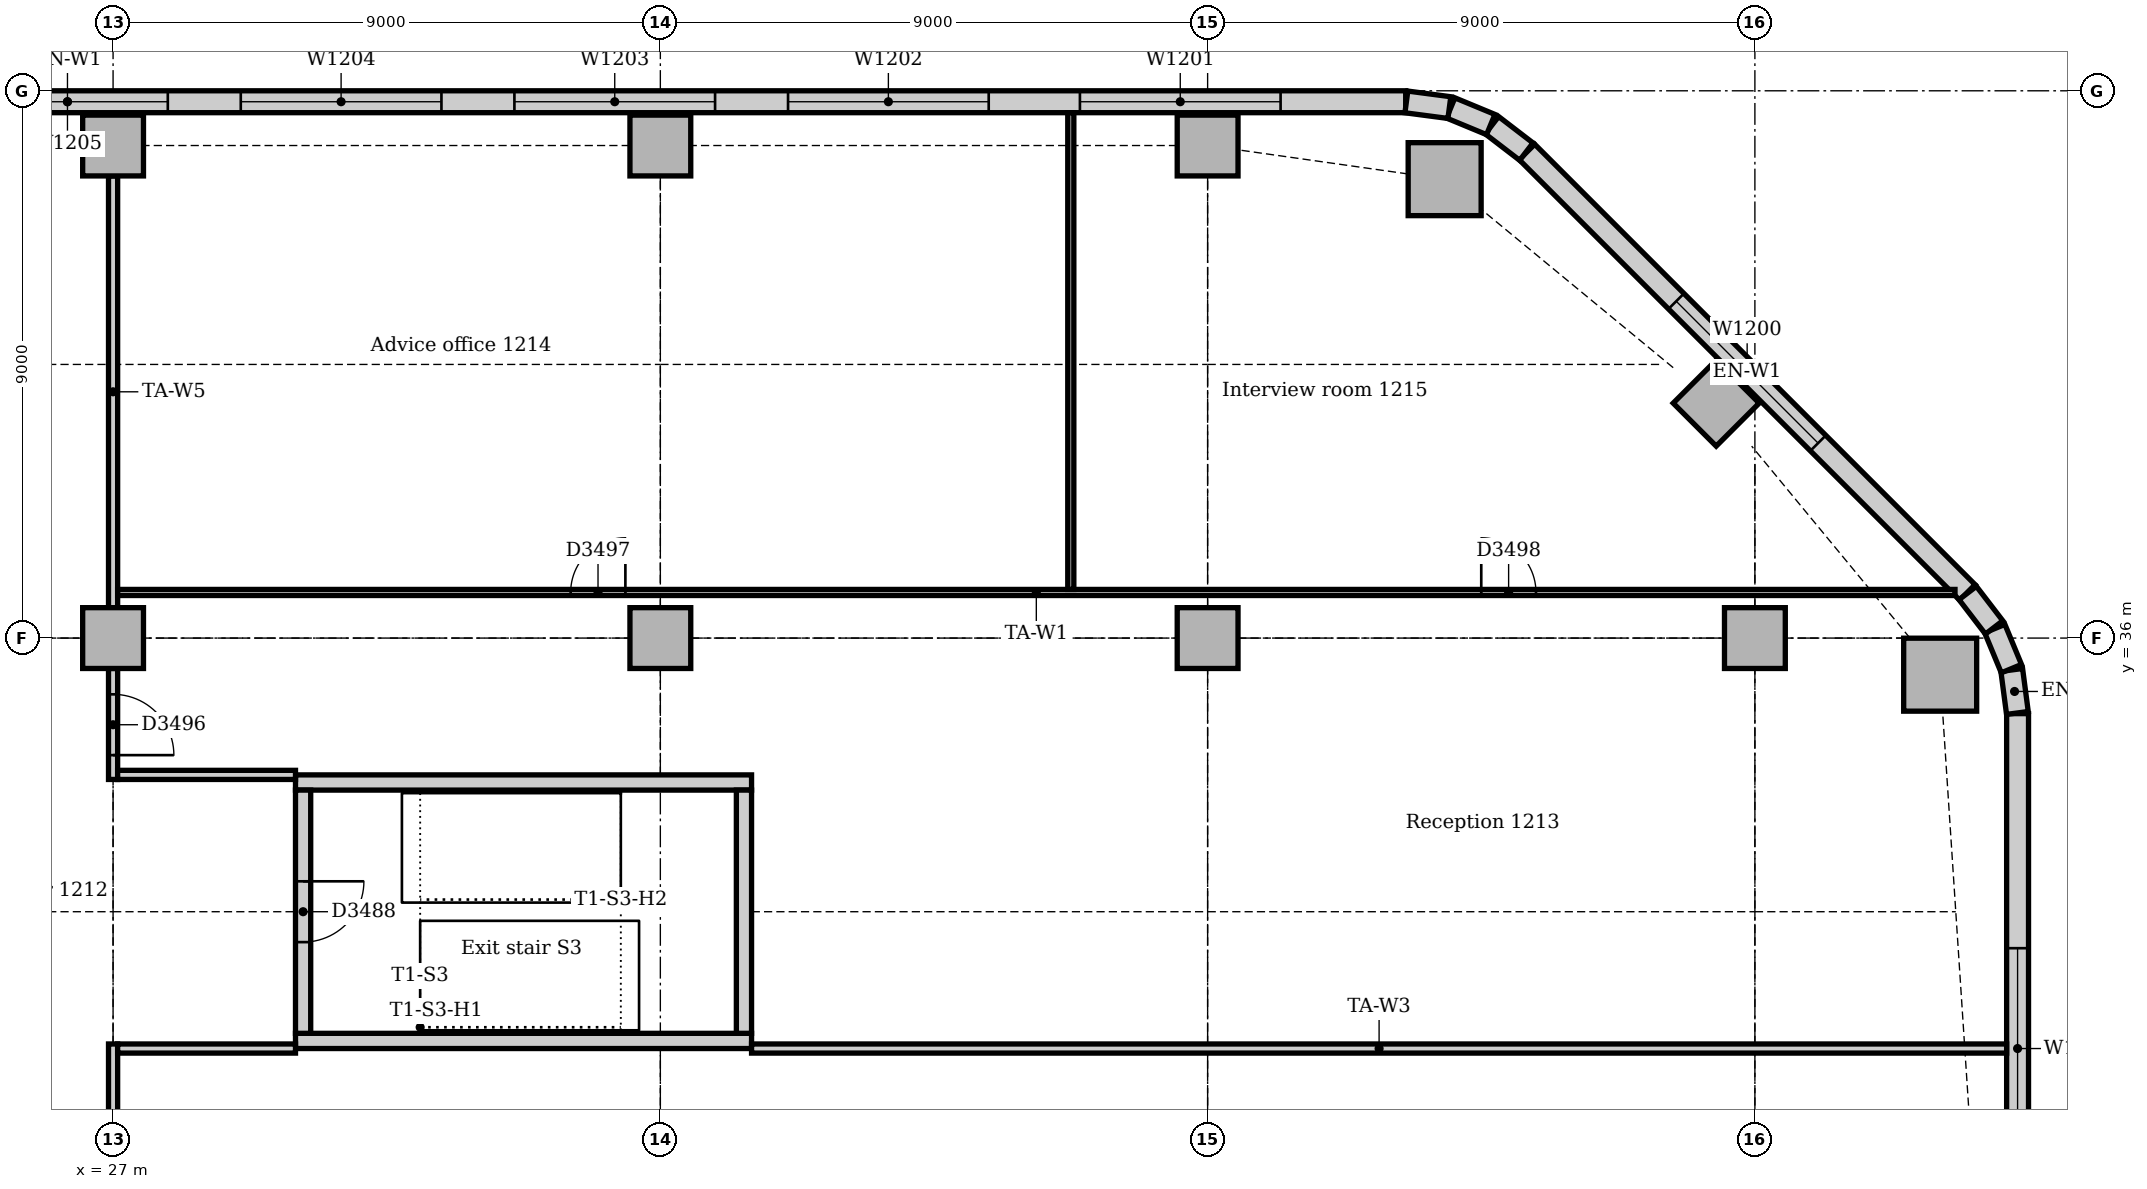
"""IFC4 building model, lengths in metres.
Left out: names, types, materials, properties, quantities, classifications, styles, units other than length and angle.
Written with IfcOpenShell. Run it as: python <this file> out.ifc"""

import sys

from ifc_helpers import new_model, si_unit, direction, frame, frame_2d, origin, origin_2d, place, context, subcontext, project, spatial, rectangle, extrude, element, fill, save


model = new_model("IFC4")
c1 = context("Model", 3, precision=1e-05, world=origin(), true_north=direction((0.0, 1.0)))
c2 = subcontext(c1, "Body", "Model", "MODEL_VIEW")
j1 = project(units=[si_unit("LENGTHUNIT", "METRE"), si_unit("PLANEANGLEUNIT", "RADIAN")], contexts=[c1])
p1 = place(None, origin())
s1 = spatial("IfcSite", under=j1, at=p1, CompositionType="ELEMENT")
p2 = place(p1, origin())
s2 = spatial("IfcBuilding", under=s1, at=p2, CompositionType="ELEMENT")
p3 = place(p2, frame((0.0, 0.0, 55.0)))
s3 = spatial("IfcBuildingStorey", under=s2, at=p3, CompositionType="ELEMENT", Elevation=55.0)
for number, where, z_axis, x_axis in (
    (1, (30.0, 29.375, 0.0), (0.0, 0.0, 1.0), (1.0, 0.0, 0.0)),
    (2, (37.5, 33.625, 0.0), (0.0, 0.0, 1.0), (-1.0, 0.0, 0.0)),
):
    element("IfcWall", number, at=place(p3, frame(where, z_axis=z_axis, x_axis=x_axis)), inside=s3, PredefinedType="SOLIDWALL", context=c2, shape_type="SweptSolid", body=[
        extrude(rectangle(XDim=7.5, YDim=0.25, at=frame_2d((3.75, 0.0))), origin(), (0.0, 0.0, 1.0), 4.0),
    ])
p4 = place(p3, frame((37.375, 29.5, 0.0), z_axis=(0.0, 0.0, 1.0), x_axis=(0.0, 1.0, 0.0)))
e3 = element("IfcWall", 3, at=p4, inside=s3, PredefinedType="SOLIDWALL", context=c2, shape_type="SweptSolid", body=[
    extrude(rectangle(XDim=4.0, YDim=0.25, at=frame_2d((2.0, 0.0))), origin(), (0.0, 0.0, 1.0), 4.0),
])
p5 = place(p3, frame((30.125, 33.5, 0.0), z_axis=(0.0, 0.0, 1.0), x_axis=(0.0, -1.0, 0.0)))
e4 = element("IfcWall", 4, at=p5, inside=s3, PredefinedType="SOLIDWALL", context=c2, shape_type="SweptSolid", body=[
    extrude(rectangle(XDim=4.0, YDim=0.25, at=frame_2d((2.0, 0.0))), origin(), (0.0, 0.0, 1.0), 4.0),
])
p6 = place(p5, frame((1.5, 0.0, 0.0)))
e5 = element("IfcOpeningElement", 5, at=p6, cuts=e4, PredefinedType="OPENING", context=c2, shape_type="SweptSolid", body=[
    extrude(rectangle(XDim=1.0, YDim=2.1, at=frame_2d((0.5, 1.05))), frame((0.0, 0.135, 0.0), z_axis=(0.0, -1.0, 0.0), x_axis=(1.0, 0.0, 0.0)), (0.0, 0.0, 1.0), 0.27),
])
for number, where, z_axis, x_axis in (
    (6, (57.047, 35.398, 0.0), (0.0, 0.0, 1.0), (1.0, 0.0, 0.0)),
    (7, (48.898, 43.547, 0.0), (0.0, 0.0, 1.0), (1.0, 0.0, 0.0)),
):
    element("IfcColumn", number, at=place(p3, frame(where, z_axis=z_axis, x_axis=x_axis)), inside=s3, PredefinedType="COLUMN", context=c2, shape_type="SweptSolid", body=[
        extrude(rectangle(XDim=1.2, YDim=1.2, at=origin_2d()), origin(), (0.0, 0.0, 1.0), 3.85),
    ])
for number, where, z_axis, x_axis in (
    (8, (53.364, 39.864, 0.0), (0.0, 0.0, 1.0), (0.707, 0.707, 0.0)),
    (9, (27.0, 44.1, 0.0), (0.0, 0.0, 1.0), (1.0, 0.0, 0.0)),
    (10, (36.0, 44.1, 0.0), (0.0, 0.0, 1.0), (1.0, 0.0, 0.0)),
    (11, (45.0, 44.1, 0.0), (0.0, 0.0, 1.0), (1.0, 0.0, 0.0)),
    (12, (27.0, 36.0, 0.0), (0.0, 0.0, 1.0), (1.0, 0.0, 0.0)),
    (13, (36.0, 36.0, 0.0), (0.0, 0.0, 1.0), (1.0, 0.0, 0.0)),
    (14, (45.0, 36.0, 0.0), (0.0, 0.0, 1.0), (1.0, 0.0, 0.0)),
    (15, (54.0, 36.0, 0.0), (0.0, 0.0, 1.0), (1.0, 0.0, 0.0)),
):
    element("IfcColumn", number, at=place(p3, frame(where, z_axis=z_axis, x_axis=x_axis)), inside=s3, PredefinedType="COLUMN", context=c2, shape_type="SweptSolid", body=[
        extrude(rectangle(XDim=1.0, YDim=1.0, at=origin_2d()), origin(), (0.0, 0.0, 1.0), 3.85),
    ])
p7 = place(p3, frame((58.32, 10.243, 0.0), z_axis=(0.0, 0.0, 1.0), x_axis=(0.0, 1.0, 0.0)))
e16 = element("IfcWall", 16, at=p7, inside=s3, PredefinedType="STANDARD", context=c2, shape_type="SweptSolid", body=[
    extrude(rectangle(XDim=24.515, YDim=0.36, at=frame_2d((12.257, 0.0))), origin(), (0.0, 0.0, 1.0), 3.85),
])
p8 = place(p7, frame((3.857, 0.0, 0.9)))
e17 = element("IfcOpeningElement", 17, at=p8, cuts=e16, PredefinedType="OPENING", context=c2, shape_type="SweptSolid", body=[
    extrude(rectangle(XDim=3.3, YDim=1.6, at=frame_2d((1.65, 0.8))), frame((0.0, 0.19, 0.0), z_axis=(0.0, -1.0, 0.0), x_axis=(1.0, 0.0, 0.0)), (0.0, 0.0, 1.0), 0.38),
])
p9 = place(p7, frame((8.757, 0.0, 0.9)))
e18 = element("IfcOpeningElement", 18, at=p9, cuts=e16, PredefinedType="OPENING", context=c2, shape_type="SweptSolid", body=[
    extrude(rectangle(XDim=1.8, YDim=1.6, at=frame_2d((0.9, 0.8))), frame((0.0, 0.19, 0.0), z_axis=(0.0, -1.0, 0.0), x_axis=(1.0, 0.0, 0.0)), (0.0, 0.0, 1.0), 0.38),
])
p10 = place(p7, frame((12.857, 0.0, 0.9)))
e19 = element("IfcOpeningElement", 19, at=p10, cuts=e16, PredefinedType="OPENING", context=c2, shape_type="SweptSolid", body=[
    extrude(rectangle(XDim=3.3, YDim=1.6, at=frame_2d((1.65, 0.8))), frame((0.0, 0.19, 0.0), z_axis=(0.0, -1.0, 0.0), x_axis=(1.0, 0.0, 0.0)), (0.0, 0.0, 1.0), 0.38),
])
p11 = place(p7, frame((17.357, 0.0, 0.9)))
e20 = element("IfcOpeningElement", 20, at=p11, cuts=e16, PredefinedType="OPENING", context=c2, shape_type="SweptSolid", body=[
    extrude(rectangle(XDim=3.3, YDim=1.6, at=frame_2d((1.65, 0.8))), frame((0.0, 0.19, 0.0), z_axis=(0.0, -1.0, 0.0), x_axis=(1.0, 0.0, 0.0)), (0.0, 0.0, 1.0), 0.38),
])
p12 = place(p3, frame((57.494, 36.751, 0.0), z_axis=(0.0, 0.0, 1.0), x_axis=(-0.707106781187, 0.707106781187, 0.0)))
e21 = element("IfcWall", 21, at=p12, inside=s3, PredefinedType="STANDARD", context=c2, shape_type="SweptSolid", body=[
    extrude(rectangle(XDim=10.243, YDim=0.36, at=frame_2d((5.121, 0.0))), origin(), (0.0, 0.0, 1.0), 3.85),
])
p13 = place(p12, frame((3.471, 0.0, 0.9)))
e22 = element("IfcOpeningElement", 22, at=p13, cuts=e21, PredefinedType="OPENING", context=c2, shape_type="SweptSolid", body=[
    extrude(rectangle(XDim=3.3, YDim=1.6, at=frame_2d((1.65, 0.8))), frame((0.0, 0.19, 0.0), z_axis=(0.0, -1.0, 0.0), x_axis=(1.0, 0.0, 0.0)), (0.0, 0.0, 1.0), 0.38),
])
p14 = place(p3, frame((48.257, 44.82, 0.0), z_axis=(0.0, 0.0, 1.0), x_axis=(-1.0, 0.0, 0.0)))
e23 = element("IfcWall", 23, at=p14, inside=s3, PredefinedType="STANDARD", context=c2, shape_type="SweptSolid", body=[
    extrude(rectangle(XDim=44.015, YDim=0.36, at=frame_2d((22.007, 0.0))), origin(), (0.0, 0.0, 1.0), 3.85),
])
p15 = place(p14, frame((2.057, 0.0, 0.9)))
e24 = element("IfcOpeningElement", 24, at=p15, cuts=e23, PredefinedType="OPENING", context=c2, shape_type="SweptSolid", body=[
    extrude(rectangle(XDim=3.3, YDim=1.6, at=frame_2d((1.65, 0.8))), frame((0.0, 0.19, 0.0), z_axis=(0.0, -1.0, 0.0), x_axis=(1.0, 0.0, 0.0)), (0.0, 0.0, 1.0), 0.38),
])
p16 = place(p14, frame((6.857, 0.0, 0.9)))
e25 = element("IfcOpeningElement", 25, at=p16, cuts=e23, PredefinedType="OPENING", context=c2, shape_type="SweptSolid", body=[
    extrude(rectangle(XDim=3.3, YDim=1.6, at=frame_2d((1.65, 0.8))), frame((0.0, 0.19, 0.0), z_axis=(0.0, -1.0, 0.0), x_axis=(1.0, 0.0, 0.0)), (0.0, 0.0, 1.0), 0.38),
])
p17 = place(p14, frame((11.357, 0.0, 0.9)))
e26 = element("IfcOpeningElement", 26, at=p17, cuts=e23, PredefinedType="OPENING", context=c2, shape_type="SweptSolid", body=[
    extrude(rectangle(XDim=3.3, YDim=1.6, at=frame_2d((1.65, 0.8))), frame((0.0, 0.19, 0.0), z_axis=(0.0, -1.0, 0.0), x_axis=(1.0, 0.0, 0.0)), (0.0, 0.0, 1.0), 0.38),
])
p18 = place(p14, frame((15.857, 0.0, 0.9)))
e27 = element("IfcOpeningElement", 27, at=p18, cuts=e23, PredefinedType="OPENING", context=c2, shape_type="SweptSolid", body=[
    extrude(rectangle(XDim=3.3, YDim=1.6, at=frame_2d((1.65, 0.8))), frame((0.0, 0.19, 0.0), z_axis=(0.0, -1.0, 0.0), x_axis=(1.0, 0.0, 0.0)), (0.0, 0.0, 1.0), 0.38),
])
p19 = place(p14, frame((20.357, 0.0, 0.9)))
e28 = element("IfcOpeningElement", 28, at=p19, cuts=e23, PredefinedType="OPENING", context=c2, shape_type="SweptSolid", body=[
    extrude(rectangle(XDim=3.3, YDim=1.6, at=frame_2d((1.65, 0.8))), frame((0.0, 0.19, 0.0), z_axis=(0.0, -1.0, 0.0), x_axis=(1.0, 0.0, 0.0)), (0.0, 0.0, 1.0), 0.38),
])
p20 = place(p14, frame((25.957, 0.0, 0.9)))
e29 = element("IfcOpeningElement", 29, at=p20, cuts=e23, PredefinedType="OPENING", context=c2, shape_type="SweptSolid", body=[
    extrude(rectangle(XDim=1.8, YDim=1.6, at=frame_2d((0.9, 0.8))), frame((0.0, 0.19, 0.0), z_axis=(0.0, -1.0, 0.0), x_axis=(1.0, 0.0, 0.0)), (0.0, 0.0, 1.0), 0.38),
])
p21 = place(p14, frame((29.357, 0.0, 0.9)))
e30 = element("IfcOpeningElement", 30, at=p21, cuts=e23, PredefinedType="OPENING", context=c2, shape_type="SweptSolid", body=[
    extrude(rectangle(XDim=3.3, YDim=1.6, at=frame_2d((1.65, 0.8))), frame((0.0, 0.19, 0.0), z_axis=(0.0, -1.0, 0.0), x_axis=(1.0, 0.0, 0.0)), (0.0, 0.0, 1.0), 0.38),
])
p22 = place(p14, frame((33.857, 0.0, 0.9)))
e31 = element("IfcOpeningElement", 31, at=p22, cuts=e23, PredefinedType="OPENING", context=c2, shape_type="SweptSolid", body=[
    extrude(rectangle(XDim=3.3, YDim=1.6, at=frame_2d((1.65, 0.8))), frame((0.0, 0.19, 0.0), z_axis=(0.0, -1.0, 0.0), x_axis=(1.0, 0.0, 0.0)), (0.0, 0.0, 1.0), 0.38),
])
p23 = place(p14, frame((38.357, 0.0, 0.9)))
e32 = element("IfcOpeningElement", 32, at=p23, cuts=e23, PredefinedType="OPENING", context=c2, shape_type="SweptSolid", body=[
    extrude(rectangle(XDim=3.3, YDim=1.6, at=frame_2d((1.65, 0.8))), frame((0.0, 0.19, 0.0), z_axis=(0.0, -1.0, 0.0), x_axis=(1.0, 0.0, 0.0)), (0.0, 0.0, 1.0), 0.38),
])
for number, where, z_axis, x_axis in (
    (33, (58.317, 34.769, 0.0), (0.0, 0.0, 1.0), (-0.131, 0.991, 0.0)),
    (34, (58.218, 35.497, 0.0), (0.0, 0.0, 1.0), (-0.383, 0.924, 0.0)),
):
    element("IfcWall", number, at=place(p3, frame(where, z_axis=z_axis, x_axis=x_axis)), inside=s3, PredefinedType="STANDARD", context=c2, shape_type="SweptSolid", body=[
        extrude(rectangle(XDim=0.713, YDim=0.36, at=frame_2d((0.356, 0.0))), origin(), (0.0, 0.0, 1.0), 3.85),
    ])
for number, where, z_axis, x_axis in (
    (35, (57.934, 36.175, 0.0), (0.0, 0.0, 1.0), (-0.609, 0.793, 0.0)),
    (36, (50.241, 44.0, 0.0), (0.0, 0.0, 1.0), (-0.793, 0.609, 0.0)),
):
    element("IfcWall", number, at=place(p3, frame(where, z_axis=z_axis, x_axis=x_axis)), inside=s3, PredefinedType="STANDARD", context=c2, shape_type="SweptSolid", body=[
        extrude(rectangle(XDim=0.713, YDim=0.36, at=frame_2d((0.357, 0.0))), origin(), (0.0, 0.0, 1.0), 3.85),
    ])
for number, where, z_axis, x_axis in (
    (37, (49.656, 44.445, 0.0), (0.0, 0.0, 1.0), (-0.924, 0.383, 0.0)),
    (38, (48.976, 44.724, 0.0), (0.0, 0.0, 1.0), (-0.991, 0.131, 0.0)),
):
    element("IfcWall", number, at=place(p3, frame(where, z_axis=z_axis, x_axis=x_axis)), inside=s3, PredefinedType="STANDARD", context=c2, shape_type="SweptSolid", body=[
        extrude(rectangle(XDim=0.713, YDim=0.36, at=frame_2d((0.356, 0.0))), origin(), (0.0, 0.0, 1.0), 3.85),
    ])
p24 = place(p3, frame((27.0, 33.675, 0.0), z_axis=(0.0, 0.0, 1.0), x_axis=(0.0, 1.0, 0.0)))
e39 = element("IfcWall", 39, at=p24, inside=s3, PredefinedType="PARTITIONING", context=c2, shape_type="SweptSolid", body=[
    extrude(rectangle(XDim=1.825, YDim=0.15, at=frame_2d((0.912, 0.0))), origin(), (0.0, 0.0, 1.0), 3.158),
])
p25 = place(p24, frame((0.4, 0.0, 0.0)))
e40 = element("IfcOpeningElement", 40, at=p25, cuts=e39, PredefinedType="OPENING", context=c2, shape_type="SweptSolid", body=[
    extrude(rectangle(XDim=1.0, YDim=2.1, at=frame_2d((0.5, 1.05))), frame((0.0, 0.085, 0.0), z_axis=(0.0, -1.0, 0.0), x_axis=(1.0, 0.0, 0.0)), (0.0, 0.0, 1.0), 0.17),
])
p26 = place(p3, frame((27.0, 36.5, 0.0), z_axis=(0.0, 0.0, 1.0), x_axis=(0.0, 1.0, 0.0)))
e41 = element("IfcWall", 41, at=p26, inside=s3, PredefinedType="PARTITIONING", context=c2, shape_type="SweptSolid", body=[
    extrude(rectangle(XDim=7.1, YDim=0.15, at=frame_2d((3.55, 0.0))), origin(), (0.0, 0.0, 1.0), 3.158),
])
p27 = place(p3, frame((27.0, 27.5, 0.0), z_axis=(0.0, 0.0, 1.0), x_axis=(0.0, 1.0, 0.0)))
e42 = element("IfcWall", 42, at=p27, inside=s3, PredefinedType="PARTITIONING", context=c2, shape_type="SweptSolid", body=[
    extrude(rectangle(XDim=1.825, YDim=0.15, at=frame_2d((0.912, 0.0))), origin(), (0.0, 0.0, 1.0), 3.158),
])
for number, where, z_axis, x_axis in (
    (43, (27.075, 29.25, 0.0), (0.0, 0.0, 1.0), (1.0, 0.0, 0.0)),
    (44, (27.075, 33.75, 0.0), (0.0, 0.0, 1.0), (1.0, 0.0, 0.0)),
):
    element("IfcWall", number, at=place(p3, frame(where, z_axis=z_axis, x_axis=x_axis)), inside=s3, PredefinedType="PARTITIONING", context=c2, shape_type="SweptSolid", body=[
        extrude(rectangle(XDim=2.925, YDim=0.15, at=frame_2d((1.462, 0.0))), origin(), (0.0, 0.0, 1.0), 3.85),
    ])
p28 = place(p3, frame((37.5, 29.25, 0.0), z_axis=(0.0, 0.0, 1.0), x_axis=(1.0, 0.0, 0.0)))
e45 = element("IfcWall", 45, at=p28, inside=s3, PredefinedType="PARTITIONING", context=c2, shape_type="SweptSolid", body=[
    extrude(rectangle(XDim=20.64, YDim=0.15, at=frame_2d((10.32, 0.0))), origin(), (0.0, 0.0, 1.0), 3.85),
])
p29 = place(p3, frame((27.075, 36.75, 0.0), z_axis=(0.0, 0.0, 1.0), x_axis=(1.0, 0.0, 0.0)))
e46 = element("IfcWall", 46, at=p29, inside=s3, PredefinedType="PARTITIONING", context=c2, shape_type="SweptSolid", body=[
    extrude(rectangle(XDim=30.216, YDim=0.1, at=frame_2d((15.108, 0.0))), origin(), (0.0, 0.0, 1.0), 3.85),
])
p30 = place(p29, frame((7.45, 0.0, 0.0)))
e47 = element("IfcOpeningElement", 47, at=p30, cuts=e46, PredefinedType="OPENING", context=c2, shape_type="SweptSolid", body=[
    extrude(rectangle(XDim=0.9, YDim=2.1, at=frame_2d((0.45, 1.05))), frame((0.0, 0.06, 0.0), z_axis=(0.0, -1.0, 0.0), x_axis=(1.0, 0.0, 0.0)), (0.0, 0.0, 1.0), 0.12),
])
p31 = place(p29, frame((22.425, 0.0, 0.0)))
e48 = element("IfcOpeningElement", 48, at=p31, cuts=e46, PredefinedType="OPENING", context=c2, shape_type="SweptSolid", body=[
    extrude(rectangle(XDim=0.9, YDim=2.1, at=frame_2d((0.45, 1.05))), frame((0.0, 0.06, 0.0), z_axis=(0.0, -1.0, 0.0), x_axis=(1.0, 0.0, 0.0)), (0.0, 0.0, 1.0), 0.12),
])
p32 = place(p3, frame((42.75, 36.8, 0.0), z_axis=(0.0, 0.0, 1.0), x_axis=(0.0, 1.0, 0.0)))
e49 = element("IfcWall", 49, at=p32, inside=s3, PredefinedType="PARTITIONING", context=c2, shape_type="SweptSolid", body=[
    extrude(rectangle(XDim=7.84, YDim=0.1, at=frame_2d((3.92, 0.0))), origin(), (0.0, 0.0, 1.0), 3.85),
])
p33 = place(p11, origin())
e50 = element("IfcWindow", 50, at=p33, inside=s3, PartitioningType="SINGLE_PANEL", PredefinedType="WINDOW", context=c2, shape_type="SweptSolid", body=[
    extrude(rectangle(XDim=3.3, YDim=1.6, at=frame_2d((1.65, 0.8))), frame((0.0, 0.13, 0.0), z_axis=(0.0, -1.0, 0.0), x_axis=(1.0, 0.0, 0.0)), (0.0, 0.0, 1.0), 0.06),
])
fill(e20, e50)
p34 = place(p13, origin())
e51 = element("IfcWindow", 51, at=p34, inside=s3, PartitioningType="SINGLE_PANEL", PredefinedType="WINDOW", context=c2, shape_type="SweptSolid", body=[
    extrude(rectangle(XDim=3.3, YDim=1.6, at=frame_2d((1.65, 0.8))), frame((0.0, 0.13, 0.0), z_axis=(0.0, -1.0, 0.0), x_axis=(1.0, 0.0, 0.0)), (0.0, 0.0, 1.0), 0.06),
])
fill(e22, e51)
p35 = place(p15, origin())
e52 = element("IfcWindow", 52, at=p35, inside=s3, PartitioningType="SINGLE_PANEL", PredefinedType="WINDOW", context=c2, shape_type="SweptSolid", body=[
    extrude(rectangle(XDim=3.3, YDim=1.6, at=frame_2d((1.65, 0.8))), frame((0.0, 0.13, 0.0), z_axis=(0.0, -1.0, 0.0), x_axis=(1.0, 0.0, 0.0)), (0.0, 0.0, 1.0), 0.06),
])
fill(e24, e52)
p36 = place(p16, origin())
e53 = element("IfcWindow", 53, at=p36, inside=s3, PartitioningType="SINGLE_PANEL", PredefinedType="WINDOW", context=c2, shape_type="SweptSolid", body=[
    extrude(rectangle(XDim=3.3, YDim=1.6, at=frame_2d((1.65, 0.8))), frame((0.0, 0.13, 0.0), z_axis=(0.0, -1.0, 0.0), x_axis=(1.0, 0.0, 0.0)), (0.0, 0.0, 1.0), 0.06),
])
fill(e25, e53)
p37 = place(p17, origin())
e54 = element("IfcWindow", 54, at=p37, inside=s3, PartitioningType="SINGLE_PANEL", PredefinedType="WINDOW", context=c2, shape_type="SweptSolid", body=[
    extrude(rectangle(XDim=3.3, YDim=1.6, at=frame_2d((1.65, 0.8))), frame((0.0, 0.13, 0.0), z_axis=(0.0, -1.0, 0.0), x_axis=(1.0, 0.0, 0.0)), (0.0, 0.0, 1.0), 0.06),
])
fill(e26, e54)
p38 = place(p18, origin())
e55 = element("IfcWindow", 55, at=p38, inside=s3, PartitioningType="SINGLE_PANEL", PredefinedType="WINDOW", context=c2, shape_type="SweptSolid", body=[
    extrude(rectangle(XDim=3.3, YDim=1.6, at=frame_2d((1.65, 0.8))), frame((0.0, 0.13, 0.0), z_axis=(0.0, -1.0, 0.0), x_axis=(1.0, 0.0, 0.0)), (0.0, 0.0, 1.0), 0.06),
])
fill(e27, e55)
p39 = place(p19, origin())
e56 = element("IfcWindow", 56, at=p39, inside=s3, PartitioningType="SINGLE_PANEL", PredefinedType="WINDOW", context=c2, shape_type="SweptSolid", body=[
    extrude(rectangle(XDim=3.3, YDim=1.6, at=frame_2d((1.65, 0.8))), frame((0.0, 0.13, 0.0), z_axis=(0.0, -1.0, 0.0), x_axis=(1.0, 0.0, 0.0)), (0.0, 0.0, 1.0), 0.06),
])
fill(e28, e56)
p40 = place(p6, origin())
e57 = element("IfcDoor", 57, at=p40, inside=s3, OperationType="SINGLE_SWING_LEFT", PredefinedType="DOOR", context=c2, shape_type="SweptSolid", body=[
    extrude(rectangle(XDim=1.0, YDim=2.1, at=frame_2d((0.5, 1.05))), frame((0.0, 0.025, 0.0), z_axis=(0.0, -1.0, 0.0), x_axis=(1.0, 0.0, 0.0)), (0.0, 0.0, 1.0), 0.05),
])
fill(e5, e57)
p41 = place(p25, frame((1.0, 0.0, 0.0), z_axis=(0.0, 0.0, 1.0), x_axis=(-1.0, 0.0, 0.0)))
e58 = element("IfcDoor", 58, at=p41, inside=s3, OperationType="SINGLE_SWING_RIGHT", PredefinedType="DOOR", context=c2, shape_type="SweptSolid", body=[
    extrude(rectangle(XDim=1.0, YDim=2.1, at=frame_2d((0.5, 1.05))), frame((0.0, 0.025, 0.0), z_axis=(0.0, -1.0, 0.0), x_axis=(1.0, 0.0, 0.0)), (0.0, 0.0, 1.0), 0.05),
])
fill(e40, e58)
p42 = place(p30, origin())
e59 = element("IfcDoor", 59, at=p42, inside=s3, OperationType="SINGLE_SWING_RIGHT", PredefinedType="DOOR", context=c2, shape_type="SweptSolid", body=[
    extrude(rectangle(XDim=0.9, YDim=2.1, at=frame_2d((0.45, 1.05))), frame((0.0, 0.025, 0.0), z_axis=(0.0, -1.0, 0.0), x_axis=(1.0, 0.0, 0.0)), (0.0, 0.0, 1.0), 0.05),
])
fill(e47, e59)
p43 = place(p31, origin())
e60 = element("IfcDoor", 60, at=p43, inside=s3, OperationType="SINGLE_SWING_LEFT", PredefinedType="DOOR", context=c2, shape_type="SweptSolid", body=[
    extrude(rectangle(XDim=0.9, YDim=2.1, at=frame_2d((0.45, 1.05))), frame((0.0, 0.025, 0.0), z_axis=(0.0, -1.0, 0.0), x_axis=(1.0, 0.0, 0.0)), (0.0, 0.0, 1.0), 0.05),
])
fill(e48, e60)
save(model, sys.argv[1])
